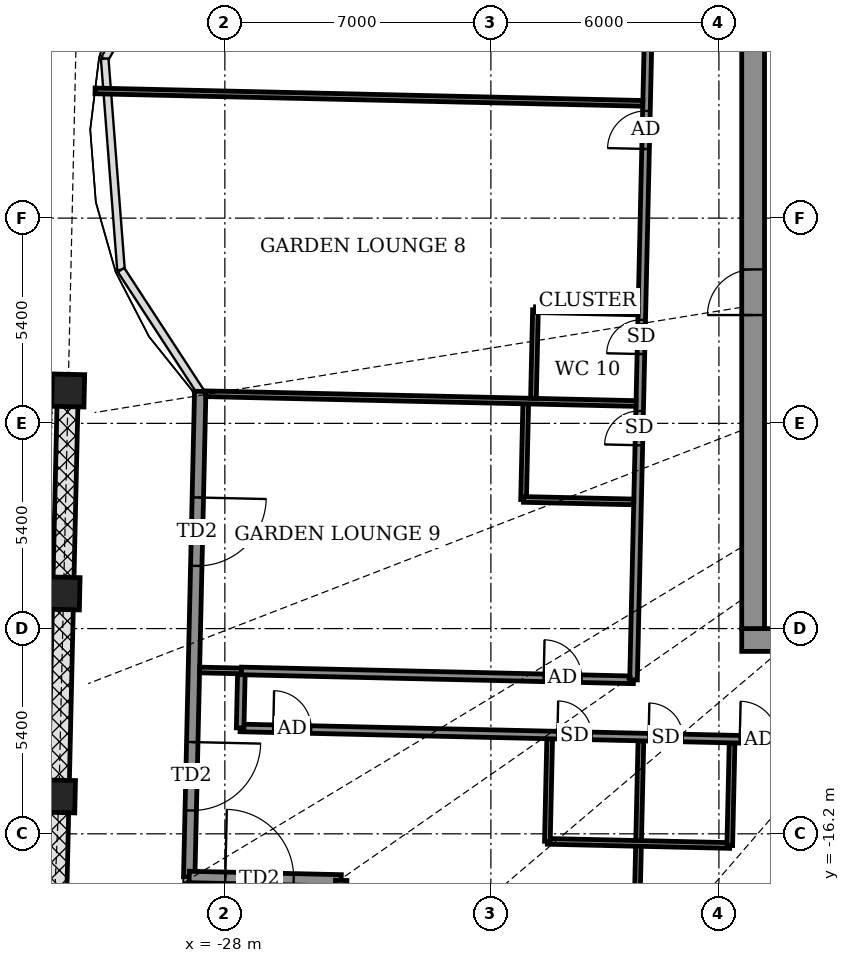
"""IFC4 building model, lengths in metres.
Left out: names, types, materials, properties, quantities, classifications, styles, units other than length and angle.
Written with IfcOpenShell. Run it as: python <this file> out.ifc"""

import sys

from ifc_helpers import new_model, si_unit, direction, frame, frame_2d, origin, origin_2d, place, context, subcontext, project, spatial, rectangle, extrude, element, fill, save


model = new_model("IFC4")
c1 = context("Model", 3, precision=1e-05, world=origin(), true_north=direction((0.0, 1.0)))
c2 = subcontext(c1, "Body", "Model", "MODEL_VIEW")
j1 = project(units=[si_unit("LENGTHUNIT", "METRE"), si_unit("PLANEANGLEUNIT", "RADIAN")], contexts=[c1])
p1 = place(None, origin())
s1 = spatial("IfcSite", under=j1, at=p1, CompositionType="ELEMENT")
p2 = place(p1, origin())
s2 = spatial("IfcBuilding", under=s1, at=p2, CompositionType="ELEMENT")
p3 = place(p2, frame((0.0, 0.0, 329.7)))
s3 = spatial("IfcBuildingStorey", under=s2, at=p3, CompositionType="ELEMENT", Elevation=329.7)
for number, where, z_axis, x_axis in (
    (1, (-32.123, -4.535, -0.55), (0.0, 0.0, 1.0), (-0.023, -1.0, 0.0)),
    (2, (-32.244, -9.875, -0.55), (0.0, 0.0, 1.0), (-0.023, -1.0, 0.0)),
    (3, (-32.365, -15.215, -0.55), (0.0, 0.0, 1.0), (-0.023, -1.0, 0.0)),
):
    element("IfcColumn", number, at=place(p3, frame(where, z_axis=z_axis, x_axis=x_axis)), inside=s3, PredefinedType="COLUMN", context=c2, shape_type="SweptSolid", body=[
        extrude(rectangle(XDim=0.85, YDim=0.85, at=origin_2d()), origin(), (0.0, 0.0, 1.0), 4.6),
    ])
p4 = place(p3, frame((-28.648, -4.559, 0.0), z_axis=(0.0, 0.0, 1.0), x_axis=(-0.022696235044, -0.99974240728, 0.0)))
e4 = element("IfcWall", 4, at=p4, inside=s3, PredefinedType="SOLIDWALL", context=c2, shape_type="SweptSolid", body=[
    extrude(rectangle(XDim=12.779, YDim=0.3, at=frame_2d((6.39, 0.0))), origin(), (0.0, 0.0, 1.0), 2.1),
])
p5 = place(p4, frame((2.792, 0.0, 0.0)))
e5 = element("IfcOpeningElement", 5, at=p5, cuts=e4, PredefinedType="OPENING", context=c2, shape_type="SweptSolid", body=[
    extrude(rectangle(XDim=1.8, YDim=2.0, at=frame_2d((0.9, 1.0))), frame((0.0, 0.16, 0.0), z_axis=(0.0, -1.0, 0.0), x_axis=(1.0, 0.0, 0.0)), (0.0, 0.0, 1.0), 0.32),
])
p6 = place(p4, frame((9.229, 0.0, 0.0)))
e6 = element("IfcOpeningElement", 6, at=p6, cuts=e4, PredefinedType="OPENING", context=c2, shape_type="SweptSolid", body=[
    extrude(rectangle(XDim=1.8, YDim=2.0, at=frame_2d((0.9, 1.0))), frame((0.0, 0.16, 0.0), z_axis=(0.0, -1.0, 0.0), x_axis=(1.0, 0.0, 0.0)), (0.0, 0.0, 1.0), 0.32),
])
p7 = place(p3, frame((-28.938, -17.335, 0.0), z_axis=(0.0, 0.0, 1.0), x_axis=(0.999746353029, -0.022521758502, 0.0)))
e7 = element("IfcWall", 7, at=p7, inside=s3, PredefinedType="SOLIDWALL", context=c2, shape_type="SweptSolid", body=[
    extrude(rectangle(XDim=4.0, YDim=0.3, at=frame_2d((2.0, 0.0))), origin(), (0.0, 0.0, 1.0), 2.1),
])
p8 = place(p7, frame((0.95, 0.0, 0.0)))
e8 = element("IfcOpeningElement", 8, at=p8, cuts=e7, PredefinedType="OPENING", context=c2, shape_type="SweptSolid", body=[
    extrude(rectangle(XDim=1.8, YDim=2.0, at=frame_2d((0.9, 1.0))), frame((0.0, 0.16, 0.0), z_axis=(0.0, -1.0, 0.0), x_axis=(1.0, 0.0, 0.0)), (0.0, 0.0, 1.0), 0.32),
])
p9 = place(p3, frame((-24.939, -17.425, 0.0), z_axis=(0.0, 0.0, 1.0), x_axis=(-0.022765770952, -0.999740826251, 0.0)))
e9 = element("IfcWall", 9, at=p9, inside=s3, PredefinedType="SOLIDWALL", context=c2, shape_type="SweptSolid", body=[
    extrude(rectangle(XDim=4.0, YDim=0.3, at=frame_2d((2.0, 0.0))), origin(), (0.0, 0.0, 1.0), 2.15),
])
p10 = place(p9, frame((1.25, 0.0, 0.0)))
e10 = element("IfcOpeningElement", 10, at=p10, cuts=e9, PredefinedType="OPENING", context=c2, shape_type="SweptSolid", body=[
    extrude(rectangle(XDim=1.8, YDim=2.0, at=frame_2d((0.9, 1.0))), frame((0.0, 0.16, 0.0), z_axis=(0.0, -1.0, 0.0), x_axis=(1.0, 0.0, 0.0)), (0.0, 0.0, 1.0), 0.32),
])
p11 = place(p3, frame((-32.462, -19.055, 0.0), z_axis=(0.0, 0.0, 1.0), x_axis=(0.022652873988, 0.999743390726, 0.0)))
e11 = element("IfcWall", 11, at=p11, inside=s3, PredefinedType="USERDEFINED", context=c2, shape_type="SweptSolid", body=[
    extrude(rectangle(XDim=14.162, YDim=0.55, at=frame_2d((7.081, 0.0))), origin(), (0.0, 0.0, 1.0), 0.8),
])
p12 = place(p3, frame((-17.235, -21.751, 0.0), z_axis=(0.0, 0.0, 1.0), x_axis=(0.022765770952, 0.999740826251, 0.0)))
e12 = element("IfcWall", 12, at=p12, inside=s3, PredefinedType="PARTITIONING", context=c2, shape_type="SweptSolid", body=[
    extrude(rectangle(XDim=8.0, YDim=0.15, at=frame_2d((4.0, 0.0))), origin(), (0.0, 0.0, 1.0), 2.15),
])
p13 = place(p3, frame((-19.514, -16.398, 0.0), z_axis=(0.0, 0.0, 1.0), x_axis=(0.999741520352, -0.022735269617, 0.0)))
e13 = element("IfcWall", 13, at=p13, inside=s3, PredefinedType="PARTITIONING", context=c2, shape_type="SweptSolid", body=[
    extrude(rectangle(XDim=4.8, YDim=0.15, at=frame_2d((2.4, 0.0))), origin(), (0.0, 0.0, 1.0), 2.15),
])
p14 = place(p3, frame((-19.514, -16.398, 0.0), z_axis=(0.0, 0.0, 1.0), x_axis=(0.02260842146, 0.999744396973, 0.0)))
e14 = element("IfcWall", 14, at=p14, inside=s3, PredefinedType="PARTITIONING", context=c2, shape_type="SweptSolid", body=[
    extrude(rectangle(XDim=2.7, YDim=0.15, at=frame_2d((1.35, 0.0))), origin(), (0.0, 0.0, 1.0), 2.15),
])
p15 = place(p3, frame((-14.715, -16.507, 0.0), z_axis=(0.0, 0.0, 1.0), x_axis=(0.02260842146, 0.999744396973, 0.0)))
e15 = element("IfcWall", 15, at=p15, inside=s3, PredefinedType="PARTITIONING", context=c2, shape_type="SweptSolid", body=[
    extrude(rectangle(XDim=2.7, YDim=0.15, at=frame_2d((1.35, 0.0))), origin(), (0.0, 0.0, 1.0), 2.25),
])
p16 = place(p3, frame((-27.598, -13.414, 0.0), z_axis=(0.0, 0.0, 1.0), x_axis=(0.999742489831, -0.022692598482, 0.0)))
e16 = element("IfcWall", 16, at=p16, inside=s3, PredefinedType="PARTITIONING", context=c2, shape_type="SweptSolid", body=[
    extrude(rectangle(XDim=52.75, YDim=0.2, at=frame_2d((26.375, 0.0))), origin(), (0.0, 0.0, 1.0), 2.1),
])
p17 = place(p16, frame((0.871, 0.0, 0.0)))
e17 = element("IfcOpeningElement", 17, at=p17, cuts=e16, PredefinedType="OPENING", context=c2, shape_type="SweptSolid", body=[
    extrude(rectangle(XDim=1.0, YDim=2.1, at=frame_2d((0.5, 1.05))), frame((0.0, 0.11, 0.0), z_axis=(0.0, -1.0, 0.0), x_axis=(1.0, 0.0, 0.0)), (0.0, 0.0, 1.0), 0.22),
])
p18 = place(p16, frame((8.35, 0.0, 0.0)))
e18 = element("IfcOpeningElement", 18, at=p18, cuts=e16, PredefinedType="OPENING", context=c2, shape_type="SweptSolid", body=[
    extrude(rectangle(XDim=0.9, YDim=2.1, at=frame_2d((0.45, 1.05))), frame((0.0, 0.11, 0.0), z_axis=(0.0, -1.0, 0.0), x_axis=(1.0, 0.0, 0.0)), (0.0, 0.0, 1.0), 0.22),
])
p19 = place(p16, frame((13.15, 0.0, 0.0)))
e19 = element("IfcOpeningElement", 19, at=p19, cuts=e16, PredefinedType="OPENING", context=c2, shape_type="SweptSolid", body=[
    extrude(rectangle(XDim=1.0, YDim=2.1, at=frame_2d((0.5, 1.05))), frame((0.0, 0.11, 0.0), z_axis=(0.0, -1.0, 0.0), x_axis=(1.0, 0.0, 0.0)), (0.0, 0.0, 1.0), 0.22),
])
p20 = place(p16, frame((10.75, 0.0, 0.0)))
e20 = element("IfcOpeningElement", 20, at=p20, cuts=e16, PredefinedType="OPENING", context=c2, shape_type="SweptSolid", body=[
    extrude(rectangle(XDim=0.9, YDim=2.1, at=frame_2d((0.45, 1.05))), frame((0.0, 0.11, 0.0), z_axis=(0.0, -1.0, 0.0), x_axis=(1.0, 0.0, 0.0)), (0.0, 0.0, 1.0), 0.22),
])
p21 = place(p16, frame((19.625, 0.0, 0.0)))
e21 = element("IfcOpeningElement", 21, at=p21, cuts=e16, PredefinedType="OPENING", context=c2, shape_type="SweptSolid", body=[
    extrude(rectangle(XDim=1.0, YDim=2.1, at=frame_2d((0.5, 1.05))), frame((0.0, 0.11, 0.0), z_axis=(0.0, -1.0, 0.0), x_axis=(1.0, 0.0, 0.0)), (0.0, 0.0, 1.0), 0.22),
])
p22 = place(p16, frame((26.874, 0.0, 0.0)))
e22 = element("IfcOpeningElement", 22, at=p22, cuts=e16, PredefinedType="OPENING", context=c2, shape_type="SweptSolid", body=[
    extrude(rectangle(XDim=1.0, YDim=2.1, at=frame_2d((0.5, 1.05))), frame((0.0, 0.11, 0.0), z_axis=(0.0, -1.0, 0.0), x_axis=(1.0, 0.0, 0.0)), (0.0, 0.0, 1.0), 0.22),
])
p23 = place(p16, frame((33.05, 0.0, 0.0)))
e23 = element("IfcOpeningElement", 23, at=p23, cuts=e16, PredefinedType="OPENING", context=c2, shape_type="SweptSolid", body=[
    extrude(rectangle(XDim=1.0, YDim=2.1, at=frame_2d((0.5, 1.05))), frame((0.0, 0.11, 0.0), z_axis=(0.0, -1.0, 0.0), x_axis=(1.0, 0.0, 0.0)), (0.0, 0.0, 1.0), 0.22),
])
p24 = place(p16, frame((35.3, 0.0, 0.0)))
e24 = element("IfcOpeningElement", 24, at=p24, cuts=e16, PredefinedType="OPENING", context=c2, shape_type="SweptSolid", body=[
    extrude(rectangle(XDim=0.9, YDim=2.1, at=frame_2d((0.45, 1.05))), frame((0.0, 0.11, 0.0), z_axis=(0.0, -1.0, 0.0), x_axis=(1.0, 0.0, 0.0)), (0.0, 0.0, 1.0), 0.22),
])
p25 = place(p16, frame((40.1, 0.0, 0.0)))
e25 = element("IfcOpeningElement", 25, at=p25, cuts=e16, PredefinedType="OPENING", context=c2, shape_type="SweptSolid", body=[
    extrude(rectangle(XDim=1.0, YDim=2.1, at=frame_2d((0.5, 1.05))), frame((0.0, 0.11, 0.0), z_axis=(0.0, -1.0, 0.0), x_axis=(1.0, 0.0, 0.0)), (0.0, 0.0, 1.0), 0.22),
])
p26 = place(p16, frame((37.7, 0.0, 0.0)))
e26 = element("IfcOpeningElement", 26, at=p26, cuts=e16, PredefinedType="OPENING", context=c2, shape_type="SweptSolid", body=[
    extrude(rectangle(XDim=0.9, YDim=2.1, at=frame_2d((0.45, 1.05))), frame((0.0, 0.11, 0.0), z_axis=(0.0, -1.0, 0.0), x_axis=(1.0, 0.0, 0.0)), (0.0, 0.0, 1.0), 0.22),
])
p27 = place(p16, frame((46.964, 0.0, 0.0)))
e27 = element("IfcOpeningElement", 27, at=p27, cuts=e16, PredefinedType="OPENING", context=c2, shape_type="SweptSolid", body=[
    extrude(rectangle(XDim=1.0, YDim=2.1, at=frame_2d((0.5, 1.05))), frame((0.0, 0.11, 0.0), z_axis=(0.0, -1.0, 0.0), x_axis=(1.0, 0.0, 0.0)), (0.0, 0.0, 1.0), 0.22),
])
p28 = place(p16, frame((42.4, 0.0, 0.0)))
e28 = element("IfcOpeningElement", 28, at=p28, cuts=e16, PredefinedType="OPENING", context=c2, shape_type="SweptSolid", body=[
    extrude(rectangle(XDim=0.9, YDim=2.1, at=frame_2d((0.45, 1.05))), frame((0.0, 0.11, 0.0), z_axis=(0.0, -1.0, 0.0), x_axis=(1.0, 0.0, 0.0)), (0.0, 0.0, 1.0), 0.22),
])
p29 = place(p3, frame((-27.598, -13.414, 0.0), z_axis=(0.0, 0.0, 1.0), x_axis=(0.022617910375, 0.999744182344, 0.0)))
e29 = element("IfcWall", 29, at=p29, inside=s3, PredefinedType="PARTITIONING", context=c2, shape_type="SweptSolid", body=[
    extrude(rectangle(XDim=1.5, YDim=0.2, at=frame_2d((0.75, 0.0))), origin(), (0.0, 0.0, 1.0), 4.05),
])
p30 = place(p3, frame((-28.664, -11.889, 0.0), z_axis=(0.0, 0.0, 1.0), x_axis=(0.999738848859, -0.022852441507, 0.0)))
e30 = element("IfcWall", 30, at=p30, inside=s3, PredefinedType="PARTITIONING", context=c2, shape_type="SweptSolid", body=[
    extrude(rectangle(XDim=1.1, YDim=0.15, at=frame_2d((0.55, 0.0))), origin(), (0.0, 0.0, 1.0), 2.15),
])
p31 = place(p3, frame((-27.564, -11.914, 0.0), z_axis=(0.0, 0.0, 1.0), x_axis=(0.999740930851, -0.02276117706, 0.0)))
e31 = element("IfcWall", 31, at=p31, inside=s3, PredefinedType="PARTITIONING", context=c2, shape_type="SweptSolid", body=[
    extrude(rectangle(XDim=10.319, YDim=0.2, at=frame_2d((5.159, 0.0))), origin(), (0.0, 0.0, 1.0), 2.1),
])
p32 = place(p31, frame((7.955, 0.0, 0.0)))
e32 = element("IfcOpeningElement", 32, at=p32, cuts=e31, PredefinedType="OPENING", context=c2, shape_type="SweptSolid", body=[
    extrude(rectangle(XDim=1.0, YDim=2.1, at=frame_2d((0.5, 1.05))), frame((0.0, 0.11, 0.0), z_axis=(0.0, -1.0, 0.0), x_axis=(1.0, 0.0, 0.0)), (0.0, 0.0, 1.0), 0.22),
])
p33 = place(p3, frame((-17.247, -12.149, 0.0), z_axis=(0.0, 0.0, 1.0), x_axis=(0.022696191528, 0.999742408268, 0.0)))
e33 = element("IfcWall", 33, at=p33, inside=s3, PredefinedType="PARTITIONING", context=c2, shape_type="SweptSolid", body=[
    extrude(rectangle(XDim=25.074, YDim=0.2, at=frame_2d((12.537, 0.0))), origin(), (0.0, 0.0, 1.0), 2.1),
])
p34 = place(p33, frame((17.425, 0.0, 0.0)))
e34 = element("IfcOpeningElement", 34, at=p34, cuts=e33, PredefinedType="OPENING", context=c2, shape_type="SweptSolid", body=[
    extrude(rectangle(XDim=1.0, YDim=2.1, at=frame_2d((0.5, 1.05))), frame((0.0, 0.11, 0.0), z_axis=(0.0, -1.0, 0.0), x_axis=(1.0, 0.0, 0.0)), (0.0, 0.0, 1.0), 0.22),
])
p35 = place(p33, frame((19.925, 0.0, 0.0)))
e35 = element("IfcOpeningElement", 35, at=p35, cuts=e33, PredefinedType="OPENING", context=c2, shape_type="SweptSolid", body=[
    extrude(rectangle(XDim=0.9, YDim=2.1, at=frame_2d((0.45, 1.05))), frame((0.0, 0.11, 0.0), z_axis=(0.0, -1.0, 0.0), x_axis=(1.0, 0.0, 0.0)), (0.0, 0.0, 1.0), 0.22),
])
p36 = place(p33, frame((13.973, 0.0, 0.0)))
e36 = element("IfcOpeningElement", 36, at=p36, cuts=e33, PredefinedType="OPENING", context=c2, shape_type="SweptSolid", body=[
    extrude(rectangle(XDim=1.0, YDim=2.1, at=frame_2d((0.5, 1.05))), frame((0.0, 0.11, 0.0), z_axis=(0.0, -1.0, 0.0), x_axis=(1.0, 0.0, 0.0)), (0.0, 0.0, 1.0), 0.22),
])
p37 = place(p33, frame((8.575, 0.0, 0.0)))
e37 = element("IfcOpeningElement", 37, at=p37, cuts=e33, PredefinedType="OPENING", context=c2, shape_type="SweptSolid", body=[
    extrude(rectangle(XDim=0.9, YDim=2.1, at=frame_2d((0.45, 1.05))), frame((0.0, 0.11, 0.0), z_axis=(0.0, -1.0, 0.0), x_axis=(1.0, 0.0, 0.0)), (0.0, 0.0, 1.0), 0.22),
])
p38 = place(p33, frame((6.175, 0.0, 0.0)))
e38 = element("IfcOpeningElement", 38, at=p38, cuts=e33, PredefinedType="OPENING", context=c2, shape_type="SweptSolid", body=[
    extrude(rectangle(XDim=0.9, YDim=2.1, at=frame_2d((0.45, 1.05))), frame((0.0, 0.11, 0.0), z_axis=(0.0, -1.0, 0.0), x_axis=(1.0, 0.0, 0.0)), (0.0, 0.0, 1.0), 0.22),
])
p39 = place(p3, frame((-20.14, -7.407, 0.0), z_axis=(0.0, 0.0, 1.0), x_axis=(0.022523775833, 0.999746307581, 0.0)))
e39 = element("IfcWall", 39, at=p39, inside=s3, PredefinedType="PARTITIONING", context=c2, shape_type="SweptSolid", body=[
    extrude(rectangle(XDim=2.526, YDim=0.15, at=frame_2d((1.263, 0.0))), origin(), (0.0, 0.0, 1.0), 2.15),
])
p40 = place(p3, frame((-20.141, -7.402, 0.0), z_axis=(0.0, 0.0, 1.0), x_axis=(0.999749214372, -0.022394382402, 0.0)))
e40 = element("IfcWall", 40, at=p40, inside=s3, PredefinedType="PARTITIONING", context=c2, shape_type="SweptSolid", body=[
    extrude(rectangle(XDim=2.9, YDim=0.15, at=frame_2d((1.45, 0.0))), origin(), (0.0, 0.0, 1.0), 2.15),
])
p41 = place(p3, frame((-28.499, -4.621, 0.0), z_axis=(0.0, 0.0, 1.0), x_axis=(0.999742525483, -0.022691027763, 0.0)))
e41 = element("IfcWall", 41, at=p41, inside=s3, PredefinedType="PARTITIONING", context=c2, shape_type="SweptSolid", body=[
    extrude(rectangle(XDim=11.319, YDim=0.15, at=frame_2d((5.659, 0.0))), origin(), (0.0, 0.0, 1.0), 2.25),
])
p42 = place(p3, frame((-19.88, -4.737, 0.0), z_axis=(0.0, 0.0, 1.0), x_axis=(0.02279059109, 0.999740260747, 0.0)))
e42 = element("IfcWall", 42, at=p42, inside=s3, PredefinedType="PARTITIONING", context=c2, shape_type="SweptSolid", body=[
    extrude(rectangle(XDim=2.324, YDim=0.15, at=frame_2d((1.162, 0.0))), origin(), (0.0, 0.0, 1.0), 2.25),
])
p43 = place(p3, frame((-19.828, -2.408, 0.0), z_axis=(0.0, 0.0, 1.0), x_axis=(0.99974458177, -0.022600248254, 0.0)))
e43 = element("IfcWall", 43, at=p43, inside=s3, PredefinedType="PARTITIONING", context=c2, shape_type="SweptSolid", body=[
    extrude(rectangle(XDim=2.701, YDim=0.15, at=frame_2d((1.35, 0.0))), origin(), (0.0, 0.0, 1.0), 2.25),
])
p44 = place(p3, frame((-31.416, 3.347, 0.0), z_axis=(0.0, 0.0, 1.0), x_axis=(0.999742848762, -0.022676779958, 0.0)))
e44 = element("IfcWall", 44, at=p44, inside=s3, PredefinedType="PARTITIONING", context=c2, shape_type="SweptSolid", body=[
    extrude(rectangle(XDim=14.416, YDim=0.15, at=frame_2d((7.208, 0.0))), origin(), (0.0, 0.0, 1.0), 2.55),
])
p45 = place(p3, frame((-14.4, -11.1, 0.0), z_axis=(0.0, 0.0, 1.0), x_axis=(1.0, 0.0, 0.0)))
e45 = element("IfcWall", 45, at=p45, inside=s3, PredefinedType="SHEAR", context=c2, shape_type="SweptSolid", body=[
    extrude(rectangle(XDim=28.8, YDim=0.6, at=frame_2d((14.4, 0.0))), origin(), (0.0, 0.0, 1.0), 4.6),
])
p46 = place(p3, frame((-14.1, -10.8, 0.0), z_axis=(0.0, 0.0, 1.0), x_axis=(0.0, 1.0, 0.0)))
e46 = element("IfcWall", 46, at=p46, inside=s3, PredefinedType="SHEAR", context=c2, shape_type="SweptSolid", body=[
    extrude(rectangle(XDim=21.6, YDim=0.6, at=frame_2d((10.8, 0.0))), origin(), (0.0, 0.0, 1.0), 4.6),
])
p47 = place(p46, frame((8.25, 0.0, 0.0)))
e47 = element("IfcOpeningElement", 47, at=p47, cuts=e46, PredefinedType="OPENING", context=c2, shape_type="SweptSolid", body=[
    extrude(rectangle(XDim=1.2, YDim=2.1, at=frame_2d((0.6, 1.05))), frame((0.0, 0.31, 0.0), z_axis=(0.0, -1.0, 0.0), x_axis=(1.0, 0.0, 0.0)), (0.0, 0.0, 1.0), 0.62),
])
p48 = place(p46, frame((15.25, 0.0, 0.0)))
e48 = element("IfcOpeningElement", 48, at=p48, cuts=e46, PredefinedType="OPENING", context=c2, shape_type="SweptSolid", body=[
    extrude(rectangle(XDim=1.2, YDim=2.1, at=frame_2d((0.6, 1.05))), frame((0.0, 0.31, 0.0), z_axis=(0.0, -1.0, 0.0), x_axis=(1.0, 0.0, 0.0)), (0.0, 0.0, 1.0), 0.62),
])
p49 = place(p5, origin())
e49 = element("IfcDoor", 49, at=p49, inside=s3, OperationType="DOUBLE_DOOR_SINGLE_SWING", PredefinedType="DOOR", context=c2, shape_type="SweptSolid", body=[
    extrude(rectangle(XDim=1.8, YDim=2.0, at=frame_2d((0.9, 1.0))), frame((0.0, 0.025, 0.0), z_axis=(0.0, -1.0, 0.0), x_axis=(1.0, 0.0, 0.0)), (0.0, 0.0, 1.0), 0.05),
])
fill(e5, e49)
p50 = place(p6, origin())
e50 = element("IfcDoor", 50, at=p50, inside=s3, OperationType="DOUBLE_DOOR_SINGLE_SWING", PredefinedType="DOOR", context=c2, shape_type="SweptSolid", body=[
    extrude(rectangle(XDim=1.8, YDim=2.0, at=frame_2d((0.9, 1.0))), frame((0.0, 0.025, 0.0), z_axis=(0.0, -1.0, 0.0), x_axis=(1.0, 0.0, 0.0)), (0.0, 0.0, 1.0), 0.05),
])
fill(e6, e50)
p51 = place(p8, origin())
e51 = element("IfcDoor", 51, at=p51, inside=s3, OperationType="DOUBLE_DOOR_SINGLE_SWING", PredefinedType="DOOR", context=c2, shape_type="SweptSolid", body=[
    extrude(rectangle(XDim=1.8, YDim=2.0, at=frame_2d((0.9, 1.0))), frame((0.0, 0.025, 0.0), z_axis=(0.0, -1.0, 0.0), x_axis=(1.0, 0.0, 0.0)), (0.0, 0.0, 1.0), 0.05),
])
fill(e8, e51)
p52 = place(p17, origin())
e52 = element("IfcDoor", 52, at=p52, inside=s3, OperationType="SINGLE_SWING_LEFT", PredefinedType="DOOR", context=c2, shape_type="SweptSolid", body=[
    extrude(rectangle(XDim=1.0, YDim=2.1, at=frame_2d((0.5, 1.05))), frame((0.0, 0.025, 0.0), z_axis=(0.0, -1.0, 0.0), x_axis=(1.0, 0.0, 0.0)), (0.0, 0.0, 1.0), 0.05),
])
fill(e17, e52)
p53 = place(p18, origin())
e53 = element("IfcDoor", 53, at=p53, inside=s3, OperationType="SINGLE_SWING_LEFT", PredefinedType="DOOR", context=c2, shape_type="SweptSolid", body=[
    extrude(rectangle(XDim=0.9, YDim=2.1, at=frame_2d((0.45, 1.05))), frame((0.0, 0.025, 0.0), z_axis=(0.0, -1.0, 0.0), x_axis=(1.0, 0.0, 0.0)), (0.0, 0.0, 1.0), 0.05),
])
fill(e18, e53)
p54 = place(p19, origin())
e54 = element("IfcDoor", 54, at=p54, inside=s3, OperationType="SINGLE_SWING_RIGHT", PredefinedType="DOOR", context=c2, shape_type="SweptSolid", body=[
    extrude(rectangle(XDim=1.0, YDim=2.1, at=frame_2d((0.5, 1.05))), frame((0.0, 0.025, 0.0), z_axis=(0.0, -1.0, 0.0), x_axis=(1.0, 0.0, 0.0)), (0.0, 0.0, 1.0), 0.05),
])
fill(e19, e54)
p55 = place(p20, origin())
e55 = element("IfcDoor", 55, at=p55, inside=s3, OperationType="SINGLE_SWING_RIGHT", PredefinedType="DOOR", context=c2, shape_type="SweptSolid", body=[
    extrude(rectangle(XDim=0.9, YDim=2.1, at=frame_2d((0.45, 1.05))), frame((0.0, 0.025, 0.0), z_axis=(0.0, -1.0, 0.0), x_axis=(1.0, 0.0, 0.0)), (0.0, 0.0, 1.0), 0.05),
])
fill(e20, e55)
p56 = place(p36, origin())
e56 = element("IfcDoor", 56, at=p56, inside=s3, OperationType="SINGLE_SWING_LEFT", PredefinedType="DOOR", context=c2, shape_type="SweptSolid", body=[
    extrude(rectangle(XDim=1.0, YDim=2.1, at=frame_2d((0.5, 1.05))), frame((0.0, 0.025, 0.0), z_axis=(0.0, -1.0, 0.0), x_axis=(1.0, 0.0, 0.0)), (0.0, 0.0, 1.0), 0.05),
])
fill(e36, e56)
p57 = place(p37, origin())
e57 = element("IfcDoor", 57, at=p57, inside=s3, OperationType="SINGLE_SWING_RIGHT", PredefinedType="DOOR", context=c2, shape_type="SweptSolid", body=[
    extrude(rectangle(XDim=0.9, YDim=2.1, at=frame_2d((0.45, 1.05))), frame((0.0, 0.025, 0.0), z_axis=(0.0, -1.0, 0.0), x_axis=(1.0, 0.0, 0.0)), (0.0, 0.0, 1.0), 0.05),
])
fill(e37, e57)
p58 = place(p32, origin())
e58 = element("IfcDoor", 58, at=p58, inside=s3, OperationType="SINGLE_SWING_RIGHT", PredefinedType="DOOR", context=c2, shape_type="SweptSolid", body=[
    extrude(rectangle(XDim=1.0, YDim=2.1, at=frame_2d((0.5, 1.05))), frame((0.0, 0.025, 0.0), z_axis=(0.0, -1.0, 0.0), x_axis=(1.0, 0.0, 0.0)), (0.0, 0.0, 1.0), 0.05),
])
fill(e32, e58)
p59 = place(p38, origin())
e59 = element("IfcDoor", 59, at=p59, inside=s3, OperationType="SINGLE_SWING_LEFT", PredefinedType="DOOR", context=c2, shape_type="SweptSolid", body=[
    extrude(rectangle(XDim=0.9, YDim=2.1, at=frame_2d((0.45, 1.05))), frame((0.0, 0.025, 0.0), z_axis=(0.0, -1.0, 0.0), x_axis=(1.0, 0.0, 0.0)), (0.0, 0.0, 1.0), 0.05),
])
fill(e38, e59)
p60 = place(p47, origin())
e60 = element("IfcDoor", 60, at=p60, inside=s3, OperationType="DOUBLE_DOOR_SINGLE_SWING", PredefinedType="DOOR", context=c2, shape_type="SweptSolid", body=[
    extrude(rectangle(XDim=1.2, YDim=2.1, at=frame_2d((0.6, 1.05))), frame((0.0, 0.025, 0.0), z_axis=(0.0, -1.0, 0.0), x_axis=(1.0, 0.0, 0.0)), (0.0, 0.0, 1.0), 0.05),
])
fill(e47, e60)
save(model, sys.argv[1])
